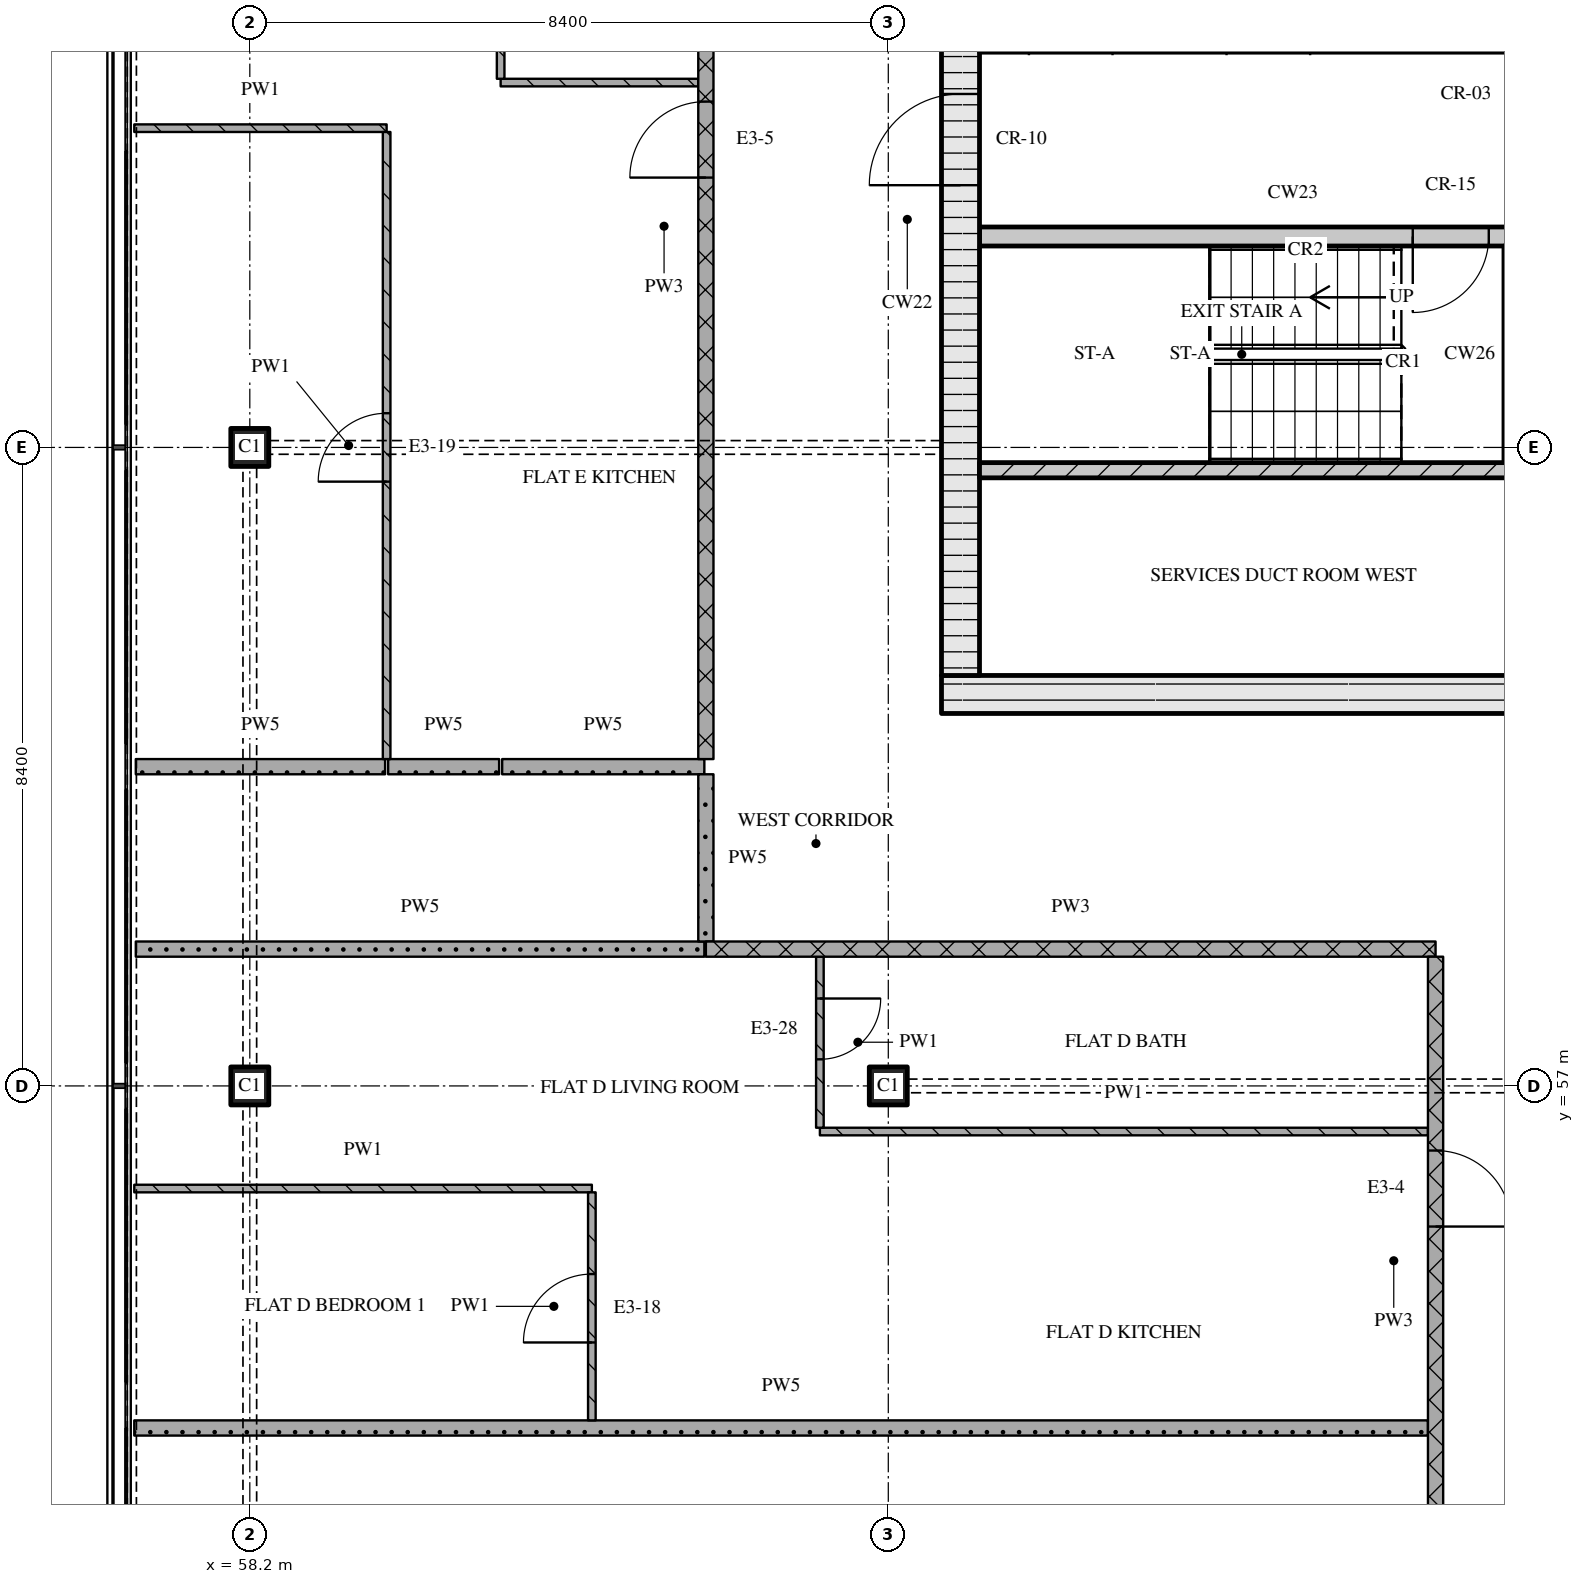
"""IFC4 building model, lengths in metres.
Left out: names, types, materials, properties, quantities, classifications, styles, units other than length and angle.
Written with IfcOpenShell. Run it as: python <this file> out.ifc"""

import sys

from ifc_helpers import new_model, si_unit, direction, frame, frame_2d, origin, origin_2d, place, context, subcontext, project, spatial, rectangle, extrude, element, fill, save


model = new_model("IFC4")
c1 = context("Model", 3, precision=1e-05, world=origin(), true_north=direction((0.0, 1.0)))
c2 = subcontext(c1, "Body", "Model", "MODEL_VIEW")
j1 = project(units=[si_unit("LENGTHUNIT", "METRE"), si_unit("PLANEANGLEUNIT", "RADIAN")], contexts=[c1])
p1 = place(None, origin())
s1 = spatial("IfcSite", under=j1, at=p1, CompositionType="ELEMENT")
p2 = place(p1, origin())
s2 = spatial("IfcBuilding", under=s1, at=p2, CompositionType="ELEMENT")
p3 = place(p2, frame((0.0, 0.0, 277.95)))
s3 = spatial("IfcBuildingStorey", under=s2, at=p3, CompositionType="ELEMENT", Elevation=277.95)
for number, where, z_axis, x_axis in (
    (1, (58.2, 57.0, 0.0), (0.0, 0.0, 1.0), (1.0, 0.0, 0.0)),
    (2, (58.2, 65.4, 0.0), (0.0, 0.0, 1.0), (1.0, 0.0, 0.0)),
    (3, (66.6, 57.0, 0.0), (0.0, 0.0, 1.0), (1.0, 0.0, 0.0)),
):
    element("IfcColumn", number, at=place(p3, frame(where, z_axis=z_axis, x_axis=x_axis)), inside=s3, PredefinedType="COLUMN", context=c2, shape_type="SweptSolid", body=[
        extrude(rectangle(XDim=0.5, YDim=0.5, at=origin_2d()), origin(), (0.0, 0.0, 1.0), 3.6),
    ])
p4 = place(p3, frame((67.3, 62.15, 0.0), z_axis=(0.0, 0.0, 1.0), x_axis=(1.0, 0.0, 0.0)))
e4 = element("IfcWall", 4, at=p4, inside=s3, PredefinedType="SOLIDWALL", context=c2, shape_type="SweptSolid", body=[
    extrude(rectangle(XDim=40.6, YDim=0.5, at=frame_2d((20.3, 0.0))), origin(), (0.0, 0.0, 1.0), 3.32),
])
p5 = place(p4, frame((20.65, 0.0, 0.0)))
e5 = element("IfcOpeningElement", 5, at=p5, cuts=e4, PredefinedType="OPENING", context=c2, shape_type="SweptSolid", body=[
    extrude(rectangle(XDim=1.8, YDim=2.1, at=frame_2d((0.9, 1.05))), frame((0.0, 0.26, 0.0), z_axis=(0.0, -1.0, 0.0), x_axis=(1.0, 0.0, 0.0)), (0.0, 0.0, 1.0), 0.52),
])
p6 = place(p3, frame((67.55, 62.4, 0.0), z_axis=(0.0, 0.0, 1.0), x_axis=(0.0, 1.0, 0.0)))
e6 = element("IfcWall", 6, at=p6, inside=s3, PredefinedType="SOLIDWALL", context=c2, shape_type="SweptSolid", body=[
    extrude(rectangle(XDim=12.0, YDim=0.5, at=frame_2d((6.0, 0.0))), origin(), (0.0, 0.0, 1.0), 3.32),
])
p7 = place(p6, frame((6.45, 0.0, 0.0)))
e7 = element("IfcOpeningElement", 7, at=p7, cuts=e6, PredefinedType="OPENING", context=c2, shape_type="SweptSolid", body=[
    extrude(rectangle(XDim=1.2, YDim=2.1, at=frame_2d((0.6, 1.05))), frame((0.0, 0.26, 0.0), z_axis=(0.0, -1.0, 0.0), x_axis=(1.0, 0.0, 0.0)), (0.0, 0.0, 1.0), 0.52),
])
p8 = place(p3, frame((67.8, 65.1, 0.0), z_axis=(0.0, 0.0, 1.0), x_axis=(1.0, 0.0, 0.0)))
e8 = element("IfcWall", 8, at=p8, inside=s3, PredefinedType="SOLIDWALL", context=c2, shape_type="SweptSolid", body=[
    extrude(rectangle(XDim=18.5, YDim=0.2, at=frame_2d((9.25, 0.0))), origin(), (0.0, 0.0, 1.0), 3.32),
])
p9 = place(p8, frame((7.27, 0.0, 0.0)))
e9 = element("IfcOpeningElement", 9, at=p9, cuts=e8, PredefinedType="OPENING", context=c2, shape_type="SweptSolid", body=[
    extrude(rectangle(XDim=0.9, YDim=2.1, at=frame_2d((0.45, 1.05))), frame((0.0, 0.11, 0.0), z_axis=(0.0, -1.0, 0.0), x_axis=(1.0, 0.0, 0.0)), (0.0, 0.0, 1.0), 0.22),
])
p10 = place(p8, frame((9.05, 0.0, 0.0)))
e10 = element("IfcOpeningElement", 10, at=p10, cuts=e8, PredefinedType="OPENING", context=c2, shape_type="SweptSolid", body=[
    extrude(rectangle(XDim=0.9, YDim=2.1, at=frame_2d((0.45, 1.05))), frame((0.0, 0.11, 0.0), z_axis=(0.0, -1.0, 0.0), x_axis=(1.0, 0.0, 0.0)), (0.0, 0.0, 1.0), 0.22),
])
p11 = place(p8, frame((12.76, 0.0, 0.0)))
e11 = element("IfcOpeningElement", 11, at=p11, cuts=e8, PredefinedType="OPENING", context=c2, shape_type="SweptSolid", body=[
    extrude(rectangle(XDim=0.9, YDim=2.1, at=frame_2d((0.45, 1.05))), frame((0.0, 0.11, 0.0), z_axis=(0.0, -1.0, 0.0), x_axis=(1.0, 0.0, 0.0)), (0.0, 0.0, 1.0), 0.22),
])
p12 = place(p8, frame((16.7, 0.0, 0.0)))
e12 = element("IfcOpeningElement", 12, at=p12, cuts=e8, PredefinedType="OPENING", context=c2, shape_type="SweptSolid", body=[
    extrude(rectangle(XDim=0.9, YDim=2.1, at=frame_2d((0.45, 1.05))), frame((0.0, 0.11, 0.0), z_axis=(0.0, -1.0, 0.0), x_axis=(1.0, 0.0, 0.0)), (0.0, 0.0, 1.0), 0.22),
])
p13 = place(p3, frame((67.8, 68.175, 0.0), z_axis=(0.0, 0.0, 1.0), x_axis=(1.0, 0.0, 0.0)))
e13 = element("IfcWall", 13, at=p13, inside=s3, PredefinedType="SOLIDWALL", context=c2, shape_type="SweptSolid", body=[
    extrude(rectangle(XDim=8.25, YDim=0.25, at=frame_2d((4.125, 0.0))), origin(), (0.0, 0.0, 1.0), 3.32),
])
p14 = place(p13, frame((5.7, 0.0, 0.0)))
e14 = element("IfcOpeningElement", 14, at=p14, cuts=e13, PredefinedType="OPENING", context=c2, shape_type="SweptSolid", body=[
    extrude(rectangle(XDim=1.0, YDim=2.1, at=frame_2d((0.5, 1.05))), frame((0.0, 0.135, 0.0), z_axis=(0.0, -1.0, 0.0), x_axis=(1.0, 0.0, 0.0)), (0.0, 0.0, 1.0), 0.27),
])
p15 = place(p13, frame((7.2, 0.0, 0.0)))
e15 = element("IfcOpeningElement", 15, at=p15, cuts=e13, PredefinedType="OPENING", context=c2, shape_type="SweptSolid", body=[
    extrude(rectangle(XDim=0.8, YDim=2.1, at=frame_2d((0.4, 1.05))), frame((0.0, 0.135, 0.0), z_axis=(0.0, -1.0, 0.0), x_axis=(1.0, 0.0, 0.0)), (0.0, 0.0, 1.0), 0.27),
])
p16 = place(p3, frame((67.8, 70.7, 0.0), z_axis=(0.0, 0.0, 1.0), x_axis=(1.0, 0.0, 0.0)))
e16 = element("IfcWall", 16, at=p16, inside=s3, PredefinedType="SOLIDWALL", context=c2, shape_type="SweptSolid", body=[
    extrude(rectangle(XDim=39.6, YDim=0.2, at=frame_2d((19.8, 0.0))), origin(), (0.0, 0.0, 1.0), 3.32),
])
p17 = place(p16, frame((0.65, 0.0, 0.0)))
e17 = element("IfcOpeningElement", 17, at=p17, cuts=e16, PredefinedType="OPENING", context=c2, shape_type="SweptSolid", body=[
    extrude(rectangle(XDim=1.1, YDim=2.1, at=frame_2d((0.55, 1.05))), frame((0.0, 0.11, 0.0), z_axis=(0.0, -1.0, 0.0), x_axis=(1.0, 0.0, 0.0)), (0.0, 0.0, 1.0), 0.22),
])
p18 = place(p16, frame((3.25, 0.0, 0.0)))
e18 = element("IfcOpeningElement", 18, at=p18, cuts=e16, PredefinedType="OPENING", context=c2, shape_type="SweptSolid", body=[
    extrude(rectangle(XDim=1.1, YDim=2.1, at=frame_2d((0.55, 1.05))), frame((0.0, 0.11, 0.0), z_axis=(0.0, -1.0, 0.0), x_axis=(1.0, 0.0, 0.0)), (0.0, 0.0, 1.0), 0.22),
])
p19 = place(p16, frame((5.9, 0.0, 0.0)))
e19 = element("IfcOpeningElement", 19, at=p19, cuts=e16, PredefinedType="OPENING", context=c2, shape_type="SweptSolid", body=[
    extrude(rectangle(XDim=1.0, YDim=2.1, at=frame_2d((0.5, 1.05))), frame((0.0, 0.11, 0.0), z_axis=(0.0, -1.0, 0.0), x_axis=(1.0, 0.0, 0.0)), (0.0, 0.0, 1.0), 0.22),
])
p20 = place(p16, frame((21.7, 0.0, 0.0)))
e20 = element("IfcOpeningElement", 20, at=p20, cuts=e16, PredefinedType="OPENING", context=c2, shape_type="SweptSolid", body=[
    extrude(rectangle(XDim=1.0, YDim=2.1, at=frame_2d((0.5, 1.05))), frame((0.0, 0.11, 0.0), z_axis=(0.0, -1.0, 0.0), x_axis=(1.0, 0.0, 0.0)), (0.0, 0.0, 1.0), 0.22),
])
p21 = place(p16, frame((32.7, 0.0, 0.0)))
e21 = element("IfcOpeningElement", 21, at=p21, cuts=e16, PredefinedType="OPENING", context=c2, shape_type="SweptSolid", body=[
    extrude(rectangle(XDim=1.0, YDim=2.1, at=frame_2d((0.5, 1.05))), frame((0.0, 0.11, 0.0), z_axis=(0.0, -1.0, 0.0), x_axis=(1.0, 0.0, 0.0)), (0.0, 0.0, 1.0), 0.22),
])
p22 = place(p16, frame((35.25, 0.0, 0.0)))
e22 = element("IfcOpeningElement", 22, at=p22, cuts=e16, PredefinedType="OPENING", context=c2, shape_type="SweptSolid", body=[
    extrude(rectangle(XDim=1.1, YDim=2.1, at=frame_2d((0.55, 1.05))), frame((0.0, 0.11, 0.0), z_axis=(0.0, -1.0, 0.0), x_axis=(1.0, 0.0, 0.0)), (0.0, 0.0, 1.0), 0.22),
])
p23 = place(p16, frame((37.85, 0.0, 0.0)))
e23 = element("IfcOpeningElement", 23, at=p23, cuts=e16, PredefinedType="OPENING", context=c2, shape_type="SweptSolid", body=[
    extrude(rectangle(XDim=1.1, YDim=2.1, at=frame_2d((0.55, 1.05))), frame((0.0, 0.11, 0.0), z_axis=(0.0, -1.0, 0.0), x_axis=(1.0, 0.0, 0.0)), (0.0, 0.0, 1.0), 0.22),
])
p24 = place(p3, frame((56.68, 52.5, 0.0), z_axis=(0.0, 0.0, 1.0), x_axis=(1.0, 0.0, 0.0)))
e24 = element("IfcWall", 24, at=p24, inside=s3, PredefinedType="PARTITIONING", context=c2, shape_type="SweptSolid", body=[
    extrude(rectangle(XDim=17.02, YDim=0.2, at=frame_2d((8.51, 0.0))), origin(), (0.0, 0.0, 1.0), 3.32),
])
p25 = place(p3, frame((56.68, 55.65, 0.0), z_axis=(0.0, 0.0, 1.0), x_axis=(1.0, 0.0, 0.0)))
e25 = element("IfcWall", 25, at=p25, inside=s3, PredefinedType="PARTITIONING", context=c2, shape_type="SweptSolid", body=[
    extrude(rectangle(XDim=6.02, YDim=0.1, at=frame_2d((3.01, 0.0))), origin(), (0.0, 0.0, 1.0), 3.32),
])
p26 = place(p3, frame((65.7, 56.4, 0.0), z_axis=(0.0, 0.0, 1.0), x_axis=(1.0, 0.0, 0.0)))
e26 = element("IfcWall", 26, at=p26, inside=s3, PredefinedType="PARTITIONING", context=c2, shape_type="SweptSolid", body=[
    extrude(rectangle(XDim=8.0, YDim=0.1, at=frame_2d((4.0, 0.0))), origin(), (0.0, 0.0, 1.0), 3.32),
])
p27 = place(p3, frame((64.2, 58.8, 0.0), z_axis=(0.0, 0.0, 1.0), x_axis=(1.0, 0.0, 0.0)))
e27 = element("IfcWall", 27, at=p27, inside=s3, PredefinedType="PARTITIONING", context=c2, shape_type="SweptSolid", body=[
    extrude(rectangle(XDim=9.6, YDim=0.2, at=frame_2d((4.8, 0.0))), origin(), (0.0, 0.0, 1.0), 3.32),
])
p28 = place(p3, frame((56.7, 58.8, 0.0), z_axis=(0.0, 0.0, 1.0), x_axis=(1.0, 0.0, 0.0)))
e28 = element("IfcWall", 28, at=p28, inside=s3, PredefinedType="PARTITIONING", context=c2, shape_type="SweptSolid", body=[
    extrude(rectangle(XDim=7.48, YDim=0.2, at=frame_2d((3.74, 0.0))), origin(), (0.0, 0.0, 1.0), 3.32),
])
p29 = place(p3, frame((56.7, 61.2, 0.0), z_axis=(0.0, 0.0, 1.0), x_axis=(1.0, 0.0, 0.0)))
e29 = element("IfcWall", 29, at=p29, inside=s3, PredefinedType="PARTITIONING", context=c2, shape_type="SweptSolid", body=[
    extrude(rectangle(XDim=3.28, YDim=0.2, at=frame_2d((1.64, 0.0))), origin(), (0.0, 0.0, 1.0), 3.32),
])
p30 = place(p3, frame((60.02, 61.2, 0.0), z_axis=(0.0, 0.0, 1.0), x_axis=(1.0, 0.0, 0.0)))
e30 = element("IfcWall", 30, at=p30, inside=s3, PredefinedType="PARTITIONING", context=c2, shape_type="SweptSolid", body=[
    extrude(rectangle(XDim=1.46, YDim=0.2, at=frame_2d((0.73, 0.0))), origin(), (0.0, 0.0, 1.0), 3.32),
])
p31 = place(p3, frame((61.52, 61.2, 0.0), z_axis=(0.0, 0.0, 1.0), x_axis=(1.0, 0.0, 0.0)))
e31 = element("IfcWall", 31, at=p31, inside=s3, PredefinedType="PARTITIONING", context=c2, shape_type="SweptSolid", body=[
    extrude(rectangle(XDim=2.66, YDim=0.2, at=frame_2d((1.33, 0.0))), origin(), (0.0, 0.0, 1.0), 3.32),
])
p32 = place(p3, frame((56.68, 69.6, 0.0), z_axis=(0.0, 0.0, 1.0), x_axis=(1.0, 0.0, 0.0)))
e32 = element("IfcWall", 32, at=p32, inside=s3, PredefinedType="PARTITIONING", context=c2, shape_type="SweptSolid", body=[
    extrude(rectangle(XDim=3.32, YDim=0.1, at=frame_2d((1.66, 0.0))), origin(), (0.0, 0.0, 1.0), 3.32),
])
p33 = place(p3, frame((61.5, 70.2, 0.0), z_axis=(0.0, 0.0, 1.0), x_axis=(1.0, 0.0, 0.0)))
e33 = element("IfcWall", 33, at=p33, inside=s3, PredefinedType="PARTITIONING", context=c2, shape_type="SweptSolid", body=[
    extrude(rectangle(XDim=2.6, YDim=0.1, at=frame_2d((1.3, 0.0))), origin(), (0.0, 0.0, 1.0), 3.32),
])
p34 = place(p3, frame((60.0, 61.3, 0.0), z_axis=(0.0, 0.0, 1.0), x_axis=(0.0, 1.0, 0.0)))
e34 = element("IfcWall", 34, at=p34, inside=s3, PredefinedType="PARTITIONING", context=c2, shape_type="SweptSolid", body=[
    extrude(rectangle(XDim=8.25, YDim=0.1, at=frame_2d((4.125, 0.0))), origin(), (0.0, 0.0, 1.0), 3.32),
])
p35 = place(p34, frame((3.65, 0.0, 0.0)))
e35 = element("IfcOpeningElement", 35, at=p35, cuts=e34, PredefinedType="OPENING", context=c2, shape_type="SweptSolid", body=[
    extrude(rectangle(XDim=0.9, YDim=2.1, at=frame_2d((0.45, 1.05))), frame((0.0, 0.06, 0.0), z_axis=(0.0, -1.0, 0.0), x_axis=(1.0, 0.0, 0.0)), (0.0, 0.0, 1.0), 0.12),
])
p36 = place(p3, frame((61.5, 75.32, 0.0), z_axis=(0.0, 0.0, 1.0), x_axis=(0.0, -1.0, 0.0)))
e36 = element("IfcWall", 36, at=p36, inside=s3, PredefinedType="PARTITIONING", context=c2, shape_type="SweptSolid", body=[
    extrude(rectangle(XDim=5.07, YDim=0.1, at=frame_2d((2.535, 0.0))), origin(), (0.0, 0.0, 1.0), 3.32),
])
p37 = place(p36, frame((2.02, 0.0, 0.0)))
e37 = element("IfcOpeningElement", 37, at=p37, cuts=e36, PredefinedType="OPENING", context=c2, shape_type="SweptSolid", body=[
    extrude(rectangle(XDim=0.8, YDim=2.1, at=frame_2d((0.4, 1.05))), frame((0.0, 0.06, 0.0), z_axis=(0.0, -1.0, 0.0), x_axis=(1.0, 0.0, 0.0)), (0.0, 0.0, 1.0), 0.12),
])
p38 = place(p3, frame((62.7, 52.6, 0.0), z_axis=(0.0, 0.0, 1.0), x_axis=(0.0, 1.0, 0.0)))
e38 = element("IfcWall", 38, at=p38, inside=s3, PredefinedType="PARTITIONING", context=c2, shape_type="SweptSolid", body=[
    extrude(rectangle(XDim=3.0, YDim=0.1, at=frame_2d((1.5, 0.0))), origin(), (0.0, 0.0, 1.0), 3.32),
])
p39 = place(p38, frame((1.025, 0.0, 0.0)))
e39 = element("IfcOpeningElement", 39, at=p39, cuts=e38, PredefinedType="OPENING", context=c2, shape_type="SweptSolid", body=[
    extrude(rectangle(XDim=0.9, YDim=2.1, at=frame_2d((0.45, 1.05))), frame((0.0, 0.06, 0.0), z_axis=(0.0, -1.0, 0.0), x_axis=(1.0, 0.0, 0.0)), (0.0, 0.0, 1.0), 0.12),
])
p40 = place(p3, frame((64.2, 61.3, 0.0), z_axis=(0.0, 0.0, 1.0), x_axis=(0.0, 1.0, 0.0)))
e40 = element("IfcWall", 40, at=p40, inside=s3, PredefinedType="PARTITIONING", context=c2, shape_type="SweptSolid", body=[
    extrude(rectangle(XDim=14.02, YDim=0.2, at=frame_2d((7.01, 0.0))), origin(), (0.0, 0.0, 1.0), 3.32),
])
p41 = place(p40, frame((7.65, 0.0, 0.0)))
e41 = element("IfcOpeningElement", 41, at=p41, cuts=e40, PredefinedType="OPENING", context=c2, shape_type="SweptSolid", body=[
    extrude(rectangle(XDim=1.0, YDim=2.1, at=frame_2d((0.5, 1.05))), frame((0.0, 0.11, 0.0), z_axis=(0.0, -1.0, 0.0), x_axis=(1.0, 0.0, 0.0)), (0.0, 0.0, 1.0), 0.22),
])
p42 = place(p3, frame((64.2, 61.1, 0.0), z_axis=(0.0, 0.0, 1.0), x_axis=(0.0, -1.0, 0.0)))
e42 = element("IfcWall", 42, at=p42, inside=s3, PredefinedType="PARTITIONING", context=c2, shape_type="SweptSolid", body=[
    extrude(rectangle(XDim=2.2, YDim=0.2, at=frame_2d((1.1, 0.0))), origin(), (0.0, 0.0, 1.0), 3.32),
])
p43 = place(p3, frame((65.7, 58.7, 0.0), z_axis=(0.0, 0.0, 1.0), x_axis=(0.0, -1.0, 0.0)))
e43 = element("IfcWall", 43, at=p43, inside=s3, PredefinedType="PARTITIONING", context=c2, shape_type="SweptSolid", body=[
    extrude(rectangle(XDim=2.25, YDim=0.1, at=frame_2d((1.125, 0.0))), origin(), (0.0, 0.0, 1.0), 3.32),
])
p44 = place(p43, frame((0.55, 0.0, 0.0)))
e44 = element("IfcOpeningElement", 44, at=p44, cuts=e43, PredefinedType="OPENING", context=c2, shape_type="SweptSolid", body=[
    extrude(rectangle(XDim=0.8, YDim=2.1, at=frame_2d((0.4, 1.05))), frame((0.0, 0.06, 0.0), z_axis=(0.0, -1.0, 0.0), x_axis=(1.0, 0.0, 0.0)), (0.0, 0.0, 1.0), 0.12),
])
p45 = place(p3, frame((73.8, 50.7, 0.0), z_axis=(0.0, 0.0, 1.0), x_axis=(0.0, 1.0, 0.0)))
e45 = element("IfcWall", 45, at=p45, inside=s3, PredefinedType="PARTITIONING", context=c2, shape_type="SweptSolid", body=[
    extrude(rectangle(XDim=8.0, YDim=0.2, at=frame_2d((4.0, 0.0))), origin(), (0.0, 0.0, 1.0), 3.32),
])
p46 = place(p45, frame((4.45, 0.0, 0.0)))
e46 = element("IfcOpeningElement", 46, at=p46, cuts=e45, PredefinedType="OPENING", context=c2, shape_type="SweptSolid", body=[
    extrude(rectangle(XDim=1.0, YDim=2.1, at=frame_2d((0.5, 1.05))), frame((0.0, 0.11, 0.0), z_axis=(0.0, -1.0, 0.0), x_axis=(1.0, 0.0, 0.0)), (0.0, 0.0, 1.0), 0.22),
])
p47 = place(p14, origin())
e47 = element("IfcDoor", 47, at=p47, inside=s3, OperationType="SINGLE_SWING_RIGHT", PredefinedType="DOOR", context=c2, shape_type="SweptSolid", body=[
    extrude(rectangle(XDim=1.0, YDim=2.1, at=frame_2d((0.5, 1.05))), frame((0.0, 0.025, 0.0), z_axis=(0.0, -1.0, 0.0), x_axis=(1.0, 0.0, 0.0)), (0.0, 0.0, 1.0), 0.05),
])
fill(e14, e47)
p48 = place(p7, origin())
e48 = element("IfcDoor", 48, at=p48, inside=s3, OperationType="SINGLE_SWING_LEFT", PredefinedType="DOOR", context=c2, shape_type="SweptSolid", body=[
    extrude(rectangle(XDim=1.2, YDim=2.1, at=frame_2d((0.6, 1.05))), frame((0.0, 0.025, 0.0), z_axis=(0.0, -1.0, 0.0), x_axis=(1.0, 0.0, 0.0)), (0.0, 0.0, 1.0), 0.05),
])
fill(e7, e48)
p49 = place(p35, origin())
e49 = element("IfcDoor", 49, at=p49, inside=s3, OperationType="SINGLE_SWING_LEFT", PredefinedType="DOOR", context=c2, shape_type="SweptSolid", body=[
    extrude(rectangle(XDim=0.9, YDim=2.1, at=frame_2d((0.45, 1.05))), frame((0.0, 0.025, 0.0), z_axis=(0.0, -1.0, 0.0), x_axis=(1.0, 0.0, 0.0)), (0.0, 0.0, 1.0), 0.05),
])
fill(e35, e49)
p50 = place(p39, origin())
e50 = element("IfcDoor", 50, at=p50, inside=s3, OperationType="SINGLE_SWING_LEFT", PredefinedType="DOOR", context=c2, shape_type="SweptSolid", body=[
    extrude(rectangle(XDim=0.9, YDim=2.1, at=frame_2d((0.45, 1.05))), frame((0.0, 0.025, 0.0), z_axis=(0.0, -1.0, 0.0), x_axis=(1.0, 0.0, 0.0)), (0.0, 0.0, 1.0), 0.05),
])
fill(e39, e50)
p51 = place(p41, origin())
e51 = element("IfcDoor", 51, at=p51, inside=s3, OperationType="SINGLE_SWING_LEFT", PredefinedType="DOOR", context=c2, shape_type="SweptSolid", body=[
    extrude(rectangle(XDim=1.0, YDim=2.1, at=frame_2d((0.5, 1.05))), frame((0.0, 0.025, 0.0), z_axis=(0.0, -1.0, 0.0), x_axis=(1.0, 0.0, 0.0)), (0.0, 0.0, 1.0), 0.05),
])
fill(e41, e51)
p52 = place(p44, origin())
e52 = element("IfcDoor", 52, at=p52, inside=s3, OperationType="SINGLE_SWING_LEFT", PredefinedType="DOOR", context=c2, shape_type="SweptSolid", body=[
    extrude(rectangle(XDim=0.8, YDim=2.1, at=frame_2d((0.4, 1.05))), frame((0.0, 0.025, 0.0), z_axis=(0.0, -1.0, 0.0), x_axis=(1.0, 0.0, 0.0)), (0.0, 0.0, 1.0), 0.05),
])
fill(e44, e52)
p53 = place(p46, origin())
e53 = element("IfcDoor", 53, at=p53, inside=s3, OperationType="SINGLE_SWING_RIGHT", PredefinedType="DOOR", context=c2, shape_type="SweptSolid", body=[
    extrude(rectangle(XDim=1.0, YDim=2.1, at=frame_2d((0.5, 1.05))), frame((0.0, 0.025, 0.0), z_axis=(0.0, -1.0, 0.0), x_axis=(1.0, 0.0, 0.0)), (0.0, 0.0, 1.0), 0.05),
])
fill(e46, e53)
save(model, sys.argv[1])
